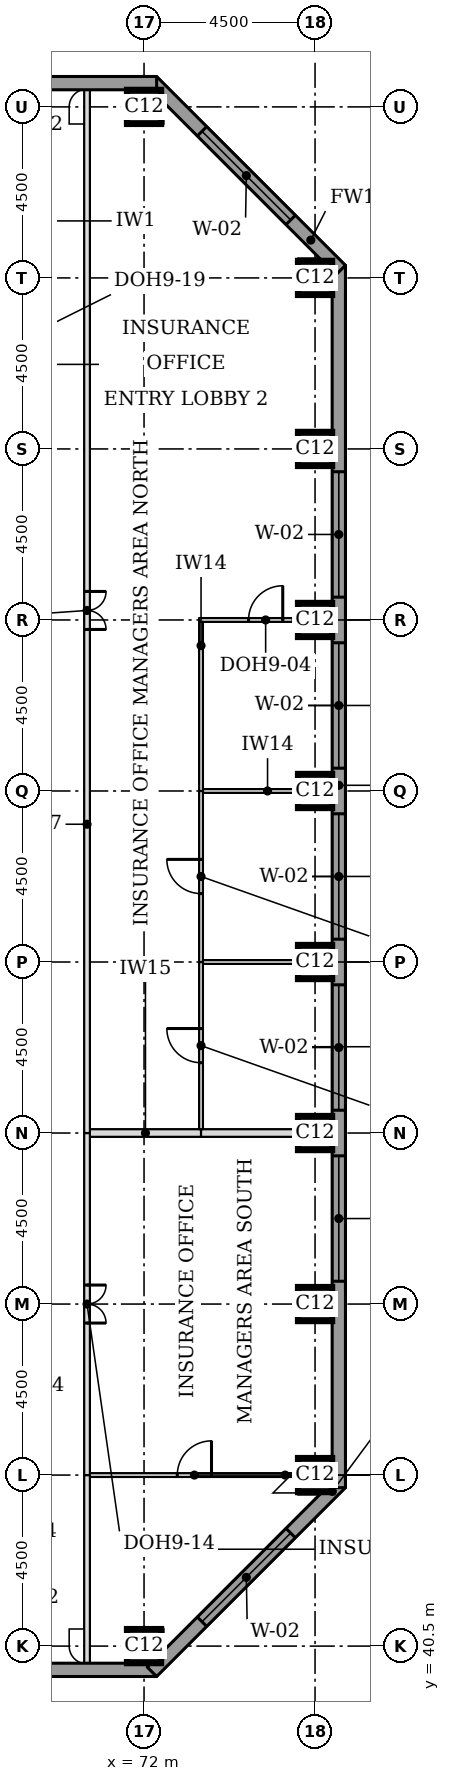
"""IFC4 building model, lengths in metres.
Left out: names, types, materials, properties, quantities, classifications, styles, units other than length and angle.
Written with IfcOpenShell. Run it as: python <this file> out.ifc"""

import sys

from ifc_helpers import new_model, si_unit, direction, frame, frame_2d, origin, origin_2d, place, context, subcontext, project, spatial, rectangle, extrude, element, fill, save


model = new_model("IFC4")
c1 = context("Model", 3, precision=1e-05, world=origin(), true_north=direction((0.0, 1.0)))
c2 = subcontext(c1, "Body", "Model", "MODEL_VIEW")
j1 = project(units=[si_unit("LENGTHUNIT", "METRE"), si_unit("PLANEANGLEUNIT", "RADIAN")], contexts=[c1])
p1 = place(None, origin())
s1 = spatial("IfcSite", under=j1, at=p1, CompositionType="ELEMENT")
p2 = place(p1, origin())
s2 = spatial("IfcBuilding", under=s1, at=p2, CompositionType="ELEMENT")
p3 = place(p2, frame((0.0, 0.0, 215.6)))
s3 = spatial("IfcBuildingStorey", under=s2, at=p3, CompositionType="ELEMENT", Elevation=215.6)
for number, where, z_axis, x_axis in (
    (1, (72.0, 40.5, 0.0), (0.0, 0.0, 1.0), (1.0, 0.0, 0.0)),
    (2, (76.5, 45.0, 0.0), (0.0, 0.0, 1.0), (1.0, 0.0, 0.0)),
    (3, (76.5, 49.5, 0.0), (0.0, 0.0, 1.0), (1.0, 0.0, 0.0)),
    (4, (76.5, 54.0, 0.0), (0.0, 0.0, 1.0), (1.0, 0.0, 0.0)),
    (5, (76.5, 58.5, 0.0), (0.0, 0.0, 1.0), (1.0, 0.0, 0.0)),
    (6, (76.5, 63.0, 0.0), (0.0, 0.0, 1.0), (1.0, 0.0, 0.0)),
    (7, (76.5, 67.5, 0.0), (0.0, 0.0, 1.0), (1.0, 0.0, 0.0)),
    (8, (76.5, 72.0, 0.0), (0.0, 0.0, 1.0), (1.0, 0.0, 0.0)),
    (9, (76.5, 76.5, 0.0), (0.0, 0.0, 1.0), (1.0, 0.0, 0.0)),
    (10, (72.0, 81.0, 0.0), (0.0, 0.0, 1.0), (1.0, 0.0, 0.0)),
):
    element("IfcColumn", number, at=place(p3, frame(where, z_axis=z_axis, x_axis=x_axis)), inside=s3, PredefinedType="COLUMN", context=c2, shape_type="SweptSolid", body=[
        extrude(rectangle(XDim=0.9, YDim=0.9, at=origin_2d()), origin(), (0.0, 0.0, 1.0), 3.7),
    ])
p4 = place(p3, frame((36.0, 39.875, 0.0), z_axis=(0.0, 0.0, 1.0), x_axis=(1.0, 0.0, 0.0)))
e11 = element("IfcWall", 11, at=p4, inside=s3, PredefinedType="STANDARD", context=c2, shape_type="SweptSolid", body=[
    extrude(rectangle(XDim=36.331, YDim=0.35, at=frame_2d((18.166, 0.0))), origin(), (0.0, 0.0, 1.0), 3.525),
])
p5 = place(p4, frame((5.1, 0.0, 0.9)))
e12 = element("IfcOpeningElement", 12, at=p5, cuts=e11, PredefinedType="OPENING", context=c2, shape_type="SweptSolid", body=[
    extrude(rectangle(XDim=3.3, YDim=1.9, at=frame_2d((1.65, 0.95))), frame((0.0, 0.185, 0.0), z_axis=(0.0, -1.0, 0.0), x_axis=(1.0, 0.0, 0.0)), (0.0, 0.0, 1.0), 0.37),
])
p6 = place(p4, frame((9.6, 0.0, 0.9)))
e13 = element("IfcOpeningElement", 13, at=p6, cuts=e11, PredefinedType="OPENING", context=c2, shape_type="SweptSolid", body=[
    extrude(rectangle(XDim=3.3, YDim=1.9, at=frame_2d((1.65, 0.95))), frame((0.0, 0.185, 0.0), z_axis=(0.0, -1.0, 0.0), x_axis=(1.0, 0.0, 0.0)), (0.0, 0.0, 1.0), 0.37),
])
p7 = place(p4, frame((14.1, 0.0, 0.9)))
e14 = element("IfcOpeningElement", 14, at=p7, cuts=e11, PredefinedType="OPENING", context=c2, shape_type="SweptSolid", body=[
    extrude(rectangle(XDim=3.3, YDim=1.9, at=frame_2d((1.65, 0.95))), frame((0.0, 0.185, 0.0), z_axis=(0.0, -1.0, 0.0), x_axis=(1.0, 0.0, 0.0)), (0.0, 0.0, 1.0), 0.37),
])
p8 = place(p4, frame((18.6, 0.0, 0.9)))
e15 = element("IfcOpeningElement", 15, at=p8, cuts=e11, PredefinedType="OPENING", context=c2, shape_type="SweptSolid", body=[
    extrude(rectangle(XDim=3.3, YDim=1.9, at=frame_2d((1.65, 0.95))), frame((0.0, 0.185, 0.0), z_axis=(0.0, -1.0, 0.0), x_axis=(1.0, 0.0, 0.0)), (0.0, 0.0, 1.0), 0.37),
])
p9 = place(p4, frame((23.1, 0.0, 0.9)))
e16 = element("IfcOpeningElement", 16, at=p9, cuts=e11, PredefinedType="OPENING", context=c2, shape_type="SweptSolid", body=[
    extrude(rectangle(XDim=3.3, YDim=1.9, at=frame_2d((1.65, 0.95))), frame((0.0, 0.185, 0.0), z_axis=(0.0, -1.0, 0.0), x_axis=(1.0, 0.0, 0.0)), (0.0, 0.0, 1.0), 0.37),
])
p10 = place(p4, frame((27.6, 0.0, 0.9)))
e17 = element("IfcOpeningElement", 17, at=p10, cuts=e11, PredefinedType="OPENING", context=c2, shape_type="SweptSolid", body=[
    extrude(rectangle(XDim=3.3, YDim=1.9, at=frame_2d((1.65, 0.95))), frame((0.0, 0.185, 0.0), z_axis=(0.0, -1.0, 0.0), x_axis=(1.0, 0.0, 0.0)), (0.0, 0.0, 1.0), 0.37),
])
p11 = place(p3, frame((72.208, 39.824, 0.0), z_axis=(0.0, 0.0, 1.0), x_axis=(0.707106781187, 0.707106781187, 0.0)))
e18 = element("IfcWall", 18, at=p11, inside=s3, PredefinedType="STANDARD", context=c2, shape_type="SweptSolid", body=[
    extrude(rectangle(XDim=7.027, YDim=0.35, at=frame_2d((3.513, 0.0))), origin(), (0.0, 0.0, 1.0), 3.525),
])
p12 = place(p11, frame((1.863, 0.0, 0.9)))
e19 = element("IfcOpeningElement", 19, at=p12, cuts=e18, PredefinedType="OPENING", context=c2, shape_type="SweptSolid", body=[
    extrude(rectangle(XDim=3.3, YDim=1.9, at=frame_2d((1.65, 0.95))), frame((0.0, 0.185, 0.0), z_axis=(0.0, -1.0, 0.0), x_axis=(1.0, 0.0, 0.0)), (0.0, 0.0, 1.0), 0.37),
])
p13 = place(p3, frame((77.125, 44.669, 0.0), z_axis=(0.0, 0.0, 1.0), x_axis=(0.0, 1.0, 0.0)))
e20 = element("IfcWall", 20, at=p13, inside=s3, PredefinedType="STANDARD", context=c2, shape_type="SweptSolid", body=[
    extrude(rectangle(XDim=32.163, YDim=0.35, at=frame_2d((16.081, 0.0))), origin(), (0.0, 0.0, 1.0), 3.525),
])
p14 = place(p13, frame((5.431, 0.0, 0.9)))
e21 = element("IfcOpeningElement", 21, at=p14, cuts=e20, PredefinedType="OPENING", context=c2, shape_type="SweptSolid", body=[
    extrude(rectangle(XDim=3.3, YDim=1.9, at=frame_2d((1.65, 0.95))), frame((0.0, 0.185, 0.0), z_axis=(0.0, -1.0, 0.0), x_axis=(1.0, 0.0, 0.0)), (0.0, 0.0, 1.0), 0.37),
])
p15 = place(p13, frame((9.931, 0.0, 0.9)))
e22 = element("IfcOpeningElement", 22, at=p15, cuts=e20, PredefinedType="OPENING", context=c2, shape_type="SweptSolid", body=[
    extrude(rectangle(XDim=3.3, YDim=1.9, at=frame_2d((1.65, 0.95))), frame((0.0, 0.185, 0.0), z_axis=(0.0, -1.0, 0.0), x_axis=(1.0, 0.0, 0.0)), (0.0, 0.0, 1.0), 0.37),
])
p16 = place(p13, frame((14.431, 0.0, 0.9)))
e23 = element("IfcOpeningElement", 23, at=p16, cuts=e20, PredefinedType="OPENING", context=c2, shape_type="SweptSolid", body=[
    extrude(rectangle(XDim=3.3, YDim=1.9, at=frame_2d((1.65, 0.95))), frame((0.0, 0.185, 0.0), z_axis=(0.0, -1.0, 0.0), x_axis=(1.0, 0.0, 0.0)), (0.0, 0.0, 1.0), 0.37),
])
p17 = place(p13, frame((18.931, 0.0, 0.9)))
e24 = element("IfcOpeningElement", 24, at=p17, cuts=e20, PredefinedType="OPENING", context=c2, shape_type="SweptSolid", body=[
    extrude(rectangle(XDim=3.3, YDim=1.9, at=frame_2d((1.65, 0.95))), frame((0.0, 0.185, 0.0), z_axis=(0.0, -1.0, 0.0), x_axis=(1.0, 0.0, 0.0)), (0.0, 0.0, 1.0), 0.37),
])
p18 = place(p13, frame((23.431, 0.0, 0.9)))
e25 = element("IfcOpeningElement", 25, at=p18, cuts=e20, PredefinedType="OPENING", context=c2, shape_type="SweptSolid", body=[
    extrude(rectangle(XDim=3.3, YDim=1.9, at=frame_2d((1.65, 0.95))), frame((0.0, 0.185, 0.0), z_axis=(0.0, -1.0, 0.0), x_axis=(1.0, 0.0, 0.0)), (0.0, 0.0, 1.0), 0.37),
])
p19 = place(p3, frame((77.176, 76.708, 0.0), z_axis=(0.0, 0.0, 1.0), x_axis=(-0.707106781187, 0.707106781187, 0.0)))
e26 = element("IfcWall", 26, at=p19, inside=s3, PredefinedType="STANDARD", context=c2, shape_type="SweptSolid", body=[
    extrude(rectangle(XDim=7.027, YDim=0.35, at=frame_2d((3.513, 0.0))), origin(), (0.0, 0.0, 1.0), 3.525),
])
p20 = place(p19, frame((1.863, 0.0, 0.9)))
e27 = element("IfcOpeningElement", 27, at=p20, cuts=e26, PredefinedType="OPENING", context=c2, shape_type="SweptSolid", body=[
    extrude(rectangle(XDim=3.3, YDim=1.9, at=frame_2d((1.65, 0.95))), frame((0.0, 0.185, 0.0), z_axis=(0.0, -1.0, 0.0), x_axis=(1.0, 0.0, 0.0)), (0.0, 0.0, 1.0), 0.37),
])
p21 = place(p3, frame((72.331, 81.625, 0.0), z_axis=(0.0, 0.0, 1.0), x_axis=(-1.0, 0.0, 0.0)))
e28 = element("IfcWall", 28, at=p21, inside=s3, PredefinedType="STANDARD", context=c2, shape_type="SweptSolid", body=[
    extrude(rectangle(XDim=32.163, YDim=0.35, at=frame_2d((16.081, 0.0))), origin(), (0.0, 0.0, 1.0), 3.525),
])
p22 = place(p21, frame((5.431, 0.0, 0.9)))
e29 = element("IfcOpeningElement", 29, at=p22, cuts=e28, PredefinedType="OPENING", context=c2, shape_type="SweptSolid", body=[
    extrude(rectangle(XDim=3.3, YDim=1.9, at=frame_2d((1.65, 0.95))), frame((0.0, 0.185, 0.0), z_axis=(0.0, -1.0, 0.0), x_axis=(1.0, 0.0, 0.0)), (0.0, 0.0, 1.0), 0.37),
])
p23 = place(p21, frame((9.931, 0.0, 0.9)))
e30 = element("IfcOpeningElement", 30, at=p23, cuts=e28, PredefinedType="OPENING", context=c2, shape_type="SweptSolid", body=[
    extrude(rectangle(XDim=3.3, YDim=1.9, at=frame_2d((1.65, 0.95))), frame((0.0, 0.185, 0.0), z_axis=(0.0, -1.0, 0.0), x_axis=(1.0, 0.0, 0.0)), (0.0, 0.0, 1.0), 0.37),
])
p24 = place(p21, frame((14.431, 0.0, 0.9)))
e31 = element("IfcOpeningElement", 31, at=p24, cuts=e28, PredefinedType="OPENING", context=c2, shape_type="SweptSolid", body=[
    extrude(rectangle(XDim=3.3, YDim=1.9, at=frame_2d((1.65, 0.95))), frame((0.0, 0.185, 0.0), z_axis=(0.0, -1.0, 0.0), x_axis=(1.0, 0.0, 0.0)), (0.0, 0.0, 1.0), 0.37),
])
p25 = place(p21, frame((18.931, 0.0, 0.9)))
e32 = element("IfcOpeningElement", 32, at=p25, cuts=e28, PredefinedType="OPENING", context=c2, shape_type="SweptSolid", body=[
    extrude(rectangle(XDim=3.3, YDim=1.9, at=frame_2d((1.65, 0.95))), frame((0.0, 0.185, 0.0), z_axis=(0.0, -1.0, 0.0), x_axis=(1.0, 0.0, 0.0)), (0.0, 0.0, 1.0), 0.37),
])
p26 = place(p21, frame((23.431, 0.0, 0.9)))
e33 = element("IfcOpeningElement", 33, at=p26, cuts=e28, PredefinedType="OPENING", context=c2, shape_type="SweptSolid", body=[
    extrude(rectangle(XDim=3.3, YDim=1.9, at=frame_2d((1.65, 0.95))), frame((0.0, 0.185, 0.0), z_axis=(0.0, -1.0, 0.0), x_axis=(1.0, 0.0, 0.0)), (0.0, 0.0, 1.0), 0.37),
])
p27 = place(p3, frame((70.575, 45.0, 0.0), z_axis=(0.0, 0.0, 1.0), x_axis=(1.0, 0.0, 0.0)))
e34 = element("IfcWall", 34, at=p27, inside=s3, PredefinedType="PARTITIONING", context=c2, shape_type="SweptSolid", body=[
    extrude(rectangle(XDim=5.475, YDim=0.1, at=frame_2d((2.738, 0.0))), origin(), (0.0, 0.0, 1.0), 3.096),
])
p28 = place(p27, frame((2.3, 0.0, 0.0)))
e35 = element("IfcOpeningElement", 35, at=p28, cuts=e34, PredefinedType="OPENING", context=c2, shape_type="SweptSolid", body=[
    extrude(rectangle(XDim=0.9, YDim=2.1, at=frame_2d((0.45, 1.05))), frame((0.0, 0.06, 0.0), z_axis=(0.0, -1.0, 0.0), x_axis=(1.0, 0.0, 0.0)), (0.0, 0.0, 1.0), 0.12),
])
p29 = place(p3, frame((70.575, 54.0, 0.0), z_axis=(0.0, 0.0, 1.0), x_axis=(1.0, 0.0, 0.0)))
e36 = element("IfcWall", 36, at=p29, inside=s3, PredefinedType="PARTITIONING", context=c2, shape_type="SweptSolid", body=[
    extrude(rectangle(XDim=2.925, YDim=0.2, at=frame_2d((1.462, 0.0))), origin(), (0.0, 0.0, 1.0), 3.55),
])
p30 = place(p3, frame((73.5, 54.0, 0.0), z_axis=(0.0, 0.0, 1.0), x_axis=(1.0, 0.0, 0.0)))
e37 = element("IfcWall", 37, at=p30, inside=s3, PredefinedType="PARTITIONING", context=c2, shape_type="SweptSolid", body=[
    extrude(rectangle(XDim=3.45, YDim=0.2, at=frame_2d((1.725, 0.0))), origin(), (0.0, 0.0, 1.0), 3.55),
])
for number, where, z_axis, x_axis in (
    (38, (73.55, 58.5, 0.0), (0.0, 0.0, 1.0), (1.0, 0.0, 0.0)),
    (39, (73.55, 63.0, 0.0), (0.0, 0.0, 1.0), (1.0, 0.0, 0.0)),
):
    element("IfcWall", number, at=place(p3, frame(where, z_axis=z_axis, x_axis=x_axis)), inside=s3, PredefinedType="PARTITIONING", context=c2, shape_type="SweptSolid", body=[
        extrude(rectangle(XDim=3.4, YDim=0.1, at=frame_2d((1.7, 0.0))), origin(), (0.0, 0.0, 1.0), 3.55),
    ])
p31 = place(p3, frame((73.45, 67.5, 0.0), z_axis=(0.0, 0.0, 1.0), x_axis=(1.0, 0.0, 0.0)))
e40 = element("IfcWall", 40, at=p31, inside=s3, PredefinedType="PARTITIONING", context=c2, shape_type="SweptSolid", body=[
    extrude(rectangle(XDim=3.5, YDim=0.1, at=frame_2d((1.75, 0.0))), origin(), (0.0, 0.0, 1.0), 3.55),
])
p32 = place(p31, frame((1.3, 0.0, 0.0)))
e41 = element("IfcOpeningElement", 41, at=p32, cuts=e40, PredefinedType="OPENING", context=c2, shape_type="SweptSolid", body=[
    extrude(rectangle(XDim=0.9, YDim=2.1, at=frame_2d((0.45, 1.05))), frame((0.0, 0.06, 0.0), z_axis=(0.0, -1.0, 0.0), x_axis=(1.0, 0.0, 0.0)), (0.0, 0.0, 1.0), 0.12),
])
p33 = place(p3, frame((70.5, 40.05, 0.0), z_axis=(0.0, 0.0, 1.0), x_axis=(0.0, 1.0, 0.0)))
e42 = element("IfcWall", 42, at=p33, inside=s3, PredefinedType="PARTITIONING", context=c2, shape_type="SweptSolid", body=[
    extrude(rectangle(XDim=4.95, YDim=0.15, at=frame_2d((2.475, 0.0))), origin(), (0.0, 0.0, 1.0), 3.55),
])
p34 = place(p3, frame((70.5, 45.0, 0.0), z_axis=(0.0, 0.0, 1.0), x_axis=(0.0, 1.0, 0.0)))
e43 = element("IfcWall", 43, at=p34, inside=s3, PredefinedType="PARTITIONING", context=c2, shape_type="SweptSolid", body=[
    extrude(rectangle(XDim=9.0, YDim=0.15, at=frame_2d((4.5, 0.0))), origin(), (0.0, 0.0, 1.0), 3.55),
])
p35 = place(p34, frame((4.0, 0.0, 0.0)))
e44 = element("IfcOpeningElement", 44, at=p35, cuts=e43, PredefinedType="OPENING", context=c2, shape_type="SweptSolid", body=[
    extrude(rectangle(XDim=1.0, YDim=2.1, at=frame_2d((0.5, 1.05))), frame((0.0, 0.085, 0.0), z_axis=(0.0, -1.0, 0.0), x_axis=(1.0, 0.0, 0.0)), (0.0, 0.0, 1.0), 0.17),
])
p36 = place(p3, frame((70.5, 54.0, 0.0), z_axis=(0.0, 0.0, 1.0), x_axis=(0.0, 1.0, 0.0)))
e45 = element("IfcWall", 45, at=p36, inside=s3, PredefinedType="PARTITIONING", context=c2, shape_type="SweptSolid", body=[
    extrude(rectangle(XDim=27.45, YDim=0.15, at=frame_2d((13.725, 0.0))), origin(), (0.0, 0.0, 1.0), 3.55),
])
p37 = place(p36, frame((13.25, 0.0, 0.0)))
e46 = element("IfcOpeningElement", 46, at=p37, cuts=e45, PredefinedType="OPENING", context=c2, shape_type="SweptSolid", body=[
    extrude(rectangle(XDim=1.0, YDim=2.1, at=frame_2d((0.5, 1.05))), frame((0.0, 0.085, 0.0), z_axis=(0.0, -1.0, 0.0), x_axis=(1.0, 0.0, 0.0)), (0.0, 0.0, 1.0), 0.17),
])
p38 = place(p3, frame((73.5, 54.1, 0.0), z_axis=(0.0, 0.0, 1.0), x_axis=(0.0, 1.0, 0.0)))
e47 = element("IfcWall", 47, at=p38, inside=s3, PredefinedType="PARTITIONING", context=c2, shape_type="SweptSolid", body=[
    extrude(rectangle(XDim=4.4, YDim=0.1, at=frame_2d((2.2, 0.0))), origin(), (0.0, 0.0, 1.0), 3.55),
])
p39 = place(p38, frame((1.75, 0.0, 0.0)))
e48 = element("IfcOpeningElement", 48, at=p39, cuts=e47, PredefinedType="OPENING", context=c2, shape_type="SweptSolid", body=[
    extrude(rectangle(XDim=0.9, YDim=2.1, at=frame_2d((0.45, 1.05))), frame((0.0, 0.06, 0.0), z_axis=(0.0, -1.0, 0.0), x_axis=(1.0, 0.0, 0.0)), (0.0, 0.0, 1.0), 0.12),
])
p40 = place(p3, frame((73.5, 58.5, 0.0), z_axis=(0.0, 0.0, 1.0), x_axis=(0.0, 1.0, 0.0)))
e49 = element("IfcWall", 49, at=p40, inside=s3, PredefinedType="PARTITIONING", context=c2, shape_type="SweptSolid", body=[
    extrude(rectangle(XDim=4.5, YDim=0.1, at=frame_2d((2.25, 0.0))), origin(), (0.0, 0.0, 1.0), 3.55),
])
p41 = place(p40, frame((1.8, 0.0, 0.0)))
e50 = element("IfcOpeningElement", 50, at=p41, cuts=e49, PredefinedType="OPENING", context=c2, shape_type="SweptSolid", body=[
    extrude(rectangle(XDim=0.9, YDim=2.1, at=frame_2d((0.45, 1.05))), frame((0.0, 0.06, 0.0), z_axis=(0.0, -1.0, 0.0), x_axis=(1.0, 0.0, 0.0)), (0.0, 0.0, 1.0), 0.12),
])
p42 = place(p3, frame((73.5, 63.0, 0.0), z_axis=(0.0, 0.0, 1.0), x_axis=(0.0, 1.0, 0.0)))
e51 = element("IfcWall", 51, at=p42, inside=s3, PredefinedType="PARTITIONING", context=c2, shape_type="SweptSolid", body=[
    extrude(rectangle(XDim=4.45, YDim=0.1, at=frame_2d((2.225, 0.0))), origin(), (0.0, 0.0, 1.0), 3.55),
])
p43 = place(p12, origin())
e52 = element("IfcWindow", 52, at=p43, inside=s3, PartitioningType="SINGLE_PANEL", PredefinedType="WINDOW", context=c2, shape_type="SweptSolid", body=[
    extrude(rectangle(XDim=3.3, YDim=1.9, at=frame_2d((1.65, 0.95))), frame((0.0, 0.085, 0.0), z_axis=(0.0, -1.0, 0.0), x_axis=(1.0, 0.0, 0.0)), (0.0, 0.0, 1.0), 0.06),
])
fill(e19, e52)
p44 = place(p14, origin())
e53 = element("IfcWindow", 53, at=p44, inside=s3, PartitioningType="SINGLE_PANEL", PredefinedType="WINDOW", context=c2, shape_type="SweptSolid", body=[
    extrude(rectangle(XDim=3.3, YDim=1.9, at=frame_2d((1.65, 0.95))), frame((0.0, 0.085, 0.0), z_axis=(0.0, -1.0, 0.0), x_axis=(1.0, 0.0, 0.0)), (0.0, 0.0, 1.0), 0.06),
])
fill(e21, e53)
p45 = place(p15, origin())
e54 = element("IfcWindow", 54, at=p45, inside=s3, PartitioningType="SINGLE_PANEL", PredefinedType="WINDOW", context=c2, shape_type="SweptSolid", body=[
    extrude(rectangle(XDim=3.3, YDim=1.9, at=frame_2d((1.65, 0.95))), frame((0.0, 0.085, 0.0), z_axis=(0.0, -1.0, 0.0), x_axis=(1.0, 0.0, 0.0)), (0.0, 0.0, 1.0), 0.06),
])
fill(e22, e54)
p46 = place(p16, origin())
e55 = element("IfcWindow", 55, at=p46, inside=s3, PartitioningType="SINGLE_PANEL", PredefinedType="WINDOW", context=c2, shape_type="SweptSolid", body=[
    extrude(rectangle(XDim=3.3, YDim=1.9, at=frame_2d((1.65, 0.95))), frame((0.0, 0.085, 0.0), z_axis=(0.0, -1.0, 0.0), x_axis=(1.0, 0.0, 0.0)), (0.0, 0.0, 1.0), 0.06),
])
fill(e23, e55)
p47 = place(p17, origin())
e56 = element("IfcWindow", 56, at=p47, inside=s3, PartitioningType="SINGLE_PANEL", PredefinedType="WINDOW", context=c2, shape_type="SweptSolid", body=[
    extrude(rectangle(XDim=3.3, YDim=1.9, at=frame_2d((1.65, 0.95))), frame((0.0, 0.085, 0.0), z_axis=(0.0, -1.0, 0.0), x_axis=(1.0, 0.0, 0.0)), (0.0, 0.0, 1.0), 0.06),
])
fill(e24, e56)
p48 = place(p18, origin())
e57 = element("IfcWindow", 57, at=p48, inside=s3, PartitioningType="SINGLE_PANEL", PredefinedType="WINDOW", context=c2, shape_type="SweptSolid", body=[
    extrude(rectangle(XDim=3.3, YDim=1.9, at=frame_2d((1.65, 0.95))), frame((0.0, 0.085, 0.0), z_axis=(0.0, -1.0, 0.0), x_axis=(1.0, 0.0, 0.0)), (0.0, 0.0, 1.0), 0.06),
])
fill(e25, e57)
p49 = place(p20, origin())
e58 = element("IfcWindow", 58, at=p49, inside=s3, PartitioningType="SINGLE_PANEL", PredefinedType="WINDOW", context=c2, shape_type="SweptSolid", body=[
    extrude(rectangle(XDim=3.3, YDim=1.9, at=frame_2d((1.65, 0.95))), frame((0.0, 0.085, 0.0), z_axis=(0.0, -1.0, 0.0), x_axis=(1.0, 0.0, 0.0)), (0.0, 0.0, 1.0), 0.06),
])
fill(e27, e58)
p50 = place(p35, frame((1.0, 0.0, 0.0), z_axis=(0.0, 0.0, 1.0), x_axis=(-1.0, 0.0, 0.0)))
e59 = element("IfcDoor", 59, at=p50, inside=s3, OperationType="DOUBLE_DOOR_SINGLE_SWING", PredefinedType="DOOR", context=c2, shape_type="SweptSolid", body=[
    extrude(rectangle(XDim=1.0, YDim=2.1, at=frame_2d((0.5, 1.05))), frame((0.0, 0.025, 0.0), z_axis=(0.0, -1.0, 0.0), x_axis=(1.0, 0.0, 0.0)), (0.0, 0.0, 1.0), 0.05),
])
fill(e44, e59)
p51 = place(p28, origin())
e60 = element("IfcDoor", 60, at=p51, inside=s3, OperationType="SINGLE_SWING_RIGHT", PredefinedType="DOOR", context=c2, shape_type="SweptSolid", body=[
    extrude(rectangle(XDim=0.9, YDim=2.1, at=frame_2d((0.45, 1.05))), frame((0.0, 0.025, 0.0), z_axis=(0.0, -1.0, 0.0), x_axis=(1.0, 0.0, 0.0)), (0.0, 0.0, 1.0), 0.05),
])
fill(e35, e60)
p52 = place(p37, frame((1.0, 0.0, 0.0), z_axis=(0.0, 0.0, 1.0), x_axis=(-1.0, 0.0, 0.0)))
e61 = element("IfcDoor", 61, at=p52, inside=s3, OperationType="DOUBLE_DOOR_SINGLE_SWING", PredefinedType="DOOR", context=c2, shape_type="SweptSolid", body=[
    extrude(rectangle(XDim=1.0, YDim=2.1, at=frame_2d((0.5, 1.05))), frame((0.0, 0.025, 0.0), z_axis=(0.0, -1.0, 0.0), x_axis=(1.0, 0.0, 0.0)), (0.0, 0.0, 1.0), 0.05),
])
fill(e46, e61)
p53 = place(p39, origin())
e62 = element("IfcDoor", 62, at=p53, inside=s3, OperationType="SINGLE_SWING_RIGHT", PredefinedType="DOOR", context=c2, shape_type="SweptSolid", body=[
    extrude(rectangle(XDim=0.9, YDim=2.1, at=frame_2d((0.45, 1.05))), frame((0.0, 0.025, 0.0), z_axis=(0.0, -1.0, 0.0), x_axis=(1.0, 0.0, 0.0)), (0.0, 0.0, 1.0), 0.05),
])
fill(e48, e62)
p54 = place(p41, origin())
e63 = element("IfcDoor", 63, at=p54, inside=s3, OperationType="SINGLE_SWING_RIGHT", PredefinedType="DOOR", context=c2, shape_type="SweptSolid", body=[
    extrude(rectangle(XDim=0.9, YDim=2.1, at=frame_2d((0.45, 1.05))), frame((0.0, 0.025, 0.0), z_axis=(0.0, -1.0, 0.0), x_axis=(1.0, 0.0, 0.0)), (0.0, 0.0, 1.0), 0.05),
])
fill(e50, e63)
p55 = place(p32, origin())
e64 = element("IfcDoor", 64, at=p55, inside=s3, OperationType="SINGLE_SWING_RIGHT", PredefinedType="DOOR", context=c2, shape_type="SweptSolid", body=[
    extrude(rectangle(XDim=0.9, YDim=2.1, at=frame_2d((0.45, 1.05))), frame((0.0, 0.025, 0.0), z_axis=(0.0, -1.0, 0.0), x_axis=(1.0, 0.0, 0.0)), (0.0, 0.0, 1.0), 0.05),
])
fill(e41, e64)
save(model, sys.argv[1])
